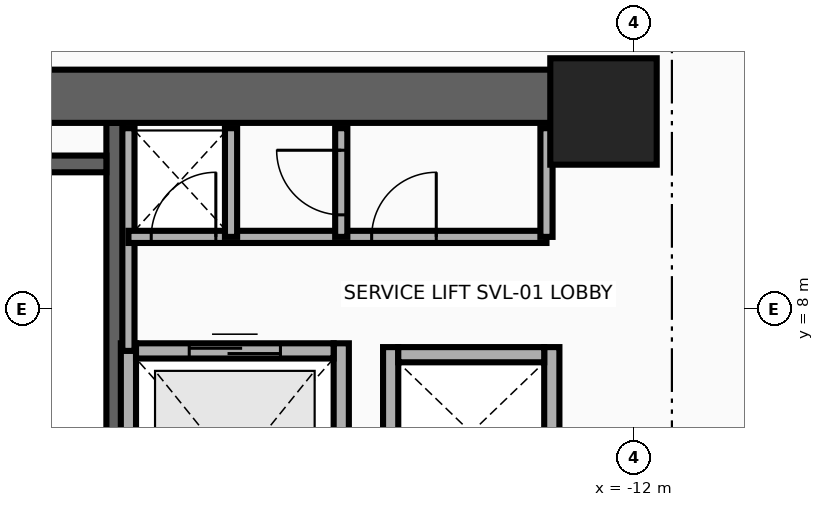
"""IFC4 building model, lengths in metres.
Left out: names, types, materials, properties, quantities, classifications, styles, units other than length and angle.
Written with IfcOpenShell. Run it as: python <this file> out.ifc"""

import sys

from ifc_helpers import new_model, si_unit, direction, frame, frame_2d, origin, origin_2d, place, context, subcontext, project, spatial, rectangle, extrude, source, transform, mapped, element, fill, save


model = new_model("IFC4")
c1 = context("Model", 3, precision=1e-05, world=origin(), true_north=direction((0.0, 1.0)))
c2 = subcontext(c1, "Body", "Model", "MODEL_VIEW")
j1 = project(units=[si_unit("LENGTHUNIT", "METRE"), si_unit("PLANEANGLEUNIT", "RADIAN")], contexts=[c1])
p1 = place(None, origin())
s1 = spatial("IfcSite", under=j1, at=p1, CompositionType="ELEMENT")
p2 = place(p1, origin())
s2 = spatial("IfcBuilding", under=s1, at=p2, CompositionType="ELEMENT")
p3 = place(p2, frame((0.0, 0.0, 29.7)))
s3 = spatial("IfcBuildingStorey", under=s2, at=p3, CompositionType="ELEMENT", Elevation=29.7)
p4 = place(p3, frame((-18.83, 1.78, 0.0), z_axis=(0.0, 0.0, 1.0), x_axis=(0.0, 1.0, 0.0)))
e1 = element("IfcWall", 1, at=p4, inside=s3, PredefinedType="SHEAR", context=c2, shape_type="SweptSolid", body=[
    extrude(rectangle(XDim=8.67, YDim=0.22, at=frame_2d((4.335, 0.0))), origin(), (0.0, 0.0, 1.0), 3.46),
])
p5 = place(p3, frame((-22.05, 9.91, 0.0), z_axis=(0.0, 0.0, 1.0), x_axis=(1.0, 0.0, 0.0)))
e2 = element("IfcWall", 2, at=p5, inside=s3, PredefinedType="SHEAR", context=c2, shape_type="SweptSolid", body=[
    extrude(rectangle(XDim=3.11, YDim=0.22, at=frame_2d((1.555, 0.0))), origin(), (0.0, 0.0, 1.0), 3.46),
])
p6 = place(p3, frame((-22.65, 10.8, 0.0), z_axis=(0.0, 0.0, 1.0), x_axis=(1.0, 0.0, 0.0)))
e3 = element("IfcWall", 3, at=p6, inside=s3, PredefinedType="SHEAR", context=c2, shape_type="SweptSolid", body=[
    extrude(rectangle(XDim=10.25, YDim=0.7, at=frame_2d((5.125, 0.0))), origin(), (0.0, 0.0, 1.0), 3.46),
])
m1 = source(origin(), c2, "Body", "SweptSolid", [
    extrude(rectangle(XDim=1.4, YDim=1.4, at=origin_2d()), origin(), (0.0, 0.0, 1.0), 3.7),
])
p7 = place(p3, frame((-12.4, 10.6, 0.0), z_axis=(0.0, 0.0, 1.0), x_axis=(1.0, 0.0, 0.0)))
e4 = element("IfcColumn", 4, at=p7, inside=s3, PredefinedType="COLUMN", context=c2, shape_type="MappedRepresentation", body=[
    mapped(m1, transform((0.0, 0.0, 0.0), x_axis=(1.0, 0.0, 0.0), y_axis=(0.0, 1.0, 0.0), z_axis=(0.0, 0.0, 1.0), scale=1.0)),
])
for number, where, z_axis, x_axis in (
    (5, (-18.65, 4.225, 0.0), (0.0, 0.0, 1.0), (0.0, 1.0, 0.0)),
    (6, (-15.85, 4.225, 0.0), (0.0, 0.0, 1.0), (0.0, 1.0, 0.0)),
):
    element("IfcWall", number, at=place(p3, frame(where, z_axis=z_axis, x_axis=x_axis)), inside=s3, PredefinedType="MOVABLE", context=c2, shape_type="SweptSolid", body=[
        extrude(rectangle(XDim=3.325, YDim=0.2, at=frame_2d((1.663, 0.0))), origin(), (0.0, 0.0, 1.0), 3.46),
    ])
p8 = place(p3, frame((-18.55, 7.45, 0.0), z_axis=(0.0, 0.0, 1.0), x_axis=(1.0, 0.0, 0.0)))
e7 = element("IfcWall", 7, at=p8, inside=s3, PredefinedType="MOVABLE", context=c2, shape_type="SweptSolid", body=[
    extrude(rectangle(XDim=2.6, YDim=0.2, at=frame_2d((1.3, 0.0))), origin(), (0.0, 0.0, 1.0), 3.46),
])
p9 = place(p8, frame((0.7, 0.0, 0.0)))
e8 = element("IfcOpeningElement", 8, at=p9, cuts=e7, PredefinedType="OPENING", context=c2, shape_type="SweptSolid", body=[
    extrude(rectangle(XDim=1.2, YDim=2.1, at=frame_2d((0.6, 1.05))), frame((0.0, 0.115, 0.0), z_axis=(0.0, -1.0, 0.0), x_axis=(1.0, 0.0, 0.0)), (0.0, 0.0, 1.0), 0.23),
])
for number, where, z_axis, x_axis in (
    (9, (-15.2, 5.25, 0.0), (0.0, 0.0, 1.0), (0.0, 1.0, 0.0)),
    (10, (-13.08, 5.25, 0.0), (0.0, 0.0, 1.0), (0.0, 1.0, 0.0)),
):
    element("IfcWall", number, at=place(p3, frame(where, z_axis=z_axis, x_axis=x_axis)), inside=s3, PredefinedType="MOVABLE", context=c2, shape_type="SweptSolid", body=[
        extrude(rectangle(XDim=2.25, YDim=0.2, at=frame_2d((1.125, 0.0))), origin(), (0.0, 0.0, 1.0), 3.46),
    ])
p10 = place(p3, frame((-15.1, 7.4, 0.0), z_axis=(0.0, 0.0, 1.0), x_axis=(1.0, 0.0, 0.0)))
e11 = element("IfcWall", 11, at=p10, inside=s3, PredefinedType="MOVABLE", context=c2, shape_type="SweptSolid", body=[
    extrude(rectangle(XDim=1.92, YDim=0.2, at=frame_2d((0.96, 0.0))), origin(), (0.0, 0.0, 1.0), 3.46),
])
p11 = place(p3, frame((-18.65, 7.45, 0.0), z_axis=(0.0, 0.0, 1.0), x_axis=(0.0, 1.0, 0.0)))
e12 = element("IfcWall", 12, at=p11, inside=s3, PredefinedType="PARTITIONING", context=c2, shape_type="SweptSolid", body=[
    extrude(rectangle(XDim=2.93, YDim=0.16, at=frame_2d((1.465, 0.0))), origin(), (0.0, 0.0, 1.0), 3.46),
])
p12 = place(p3, frame((-18.65, 8.95, 0.0), z_axis=(0.0, 0.0, 1.0), x_axis=(1.0, 0.0, 0.0)))
e13 = element("IfcWall", 13, at=p12, inside=s3, PredefinedType="PARTITIONING", context=c2, shape_type="SweptSolid", body=[
    extrude(rectangle(XDim=5.5, YDim=0.16, at=frame_2d((2.75, 0.0))), origin(), (0.0, 0.0, 1.0), 3.46),
])
p13 = place(p12, frame((0.3, 0.0, 0.0)))
e14 = element("IfcOpeningElement", 14, at=p13, cuts=e13, PredefinedType="OPENING", context=c2, shape_type="SweptSolid", body=[
    extrude(rectangle(XDim=0.85, YDim=2.05, at=frame_2d((0.425, 1.025))), frame((0.0, 0.095, 0.0), z_axis=(0.0, -1.0, 0.0), x_axis=(1.0, 0.0, 0.0)), (0.0, 0.0, 1.0), 0.19),
])
p14 = place(p12, frame((3.2, 0.0, 0.0)))
e15 = element("IfcOpeningElement", 15, at=p14, cuts=e13, PredefinedType="OPENING", context=c2, shape_type="SweptSolid", body=[
    extrude(rectangle(XDim=0.85, YDim=2.05, at=frame_2d((0.425, 1.025))), frame((0.0, 0.095, 0.0), z_axis=(0.0, -1.0, 0.0), x_axis=(1.0, 0.0, 0.0)), (0.0, 0.0, 1.0), 0.19),
])
for number, where, z_axis, x_axis in (
    (16, (-13.15, 8.95, 0.0), (0.0, 0.0, 1.0), (0.0, 1.0, 0.0)),
    (17, (-17.3, 8.95, 0.0), (0.0, 0.0, 1.0), (0.0, 1.0, 0.0)),
):
    element("IfcWall", number, at=place(p3, frame(where, z_axis=z_axis, x_axis=x_axis)), inside=s3, PredefinedType="PARTITIONING", context=c2, shape_type="SweptSolid", body=[
        extrude(rectangle(XDim=1.43, YDim=0.16, at=frame_2d((0.715, 0.0))), origin(), (0.0, 0.0, 1.0), 3.46),
    ])
p15 = place(p3, frame((-15.85, 8.95, 0.0), z_axis=(0.0, 0.0, 1.0), x_axis=(0.0, 1.0, 0.0)))
e18 = element("IfcWall", 18, at=p15, inside=s3, PredefinedType="PARTITIONING", context=c2, shape_type="SweptSolid", body=[
    extrude(rectangle(XDim=1.43, YDim=0.16, at=frame_2d((0.715, 0.0))), origin(), (0.0, 0.0, 1.0), 3.46),
])
p16 = place(p15, frame((0.29, 0.0, 0.0)))
e19 = element("IfcOpeningElement", 19, at=p16, cuts=e18, PredefinedType="OPENING", context=c2, shape_type="SweptSolid", body=[
    extrude(rectangle(XDim=0.85, YDim=2.05, at=frame_2d((0.425, 1.025))), frame((0.0, 0.095, 0.0), z_axis=(0.0, -1.0, 0.0), x_axis=(1.0, 0.0, 0.0)), (0.0, 0.0, 1.0), 0.19),
])
p17 = place(p9, origin())
e20 = element("IfcDoor", 20, at=p17, inside=s3, OperationType="DOUBLE_DOOR_SLIDING", PredefinedType="DOOR", context=c2, shape_type="SweptSolid", body=[
    extrude(rectangle(XDim=1.2, YDim=2.1, at=frame_2d((0.6, 1.05))), frame((0.0, 0.025, 0.0), z_axis=(0.0, -1.0, 0.0), x_axis=(1.0, 0.0, 0.0)), (0.0, 0.0, 1.0), 0.05),
])
fill(e8, e20)
p18 = place(p13, origin())
e21 = element("IfcDoor", 21, at=p18, inside=s3, OperationType="SINGLE_SWING_LEFT", PredefinedType="DOOR", context=c2, shape_type="SweptSolid", body=[
    extrude(rectangle(XDim=0.85, YDim=2.05, at=frame_2d((0.425, 1.025))), frame((0.0, 0.025, 0.0), z_axis=(0.0, -1.0, 0.0), x_axis=(1.0, 0.0, 0.0)), (0.0, 0.0, 1.0), 0.05),
])
fill(e14, e21)
p19 = place(p14, origin())
e22 = element("IfcDoor", 22, at=p19, inside=s3, OperationType="SINGLE_SWING_RIGHT", PredefinedType="DOOR", context=c2, shape_type="SweptSolid", body=[
    extrude(rectangle(XDim=0.85, YDim=2.05, at=frame_2d((0.425, 1.025))), frame((0.0, 0.025, 0.0), z_axis=(0.0, -1.0, 0.0), x_axis=(1.0, 0.0, 0.0)), (0.0, 0.0, 1.0), 0.05),
])
fill(e15, e22)
p20 = place(p16, origin())
e23 = element("IfcDoor", 23, at=p20, inside=s3, OperationType="SINGLE_SWING_LEFT", PredefinedType="DOOR", context=c2, shape_type="SweptSolid", body=[
    extrude(rectangle(XDim=0.85, YDim=2.05, at=frame_2d((0.425, 1.025))), frame((0.0, 0.025, 0.0), z_axis=(0.0, -1.0, 0.0), x_axis=(1.0, 0.0, 0.0)), (0.0, 0.0, 1.0), 0.05),
])
fill(e19, e23)
save(model, sys.argv[1])
